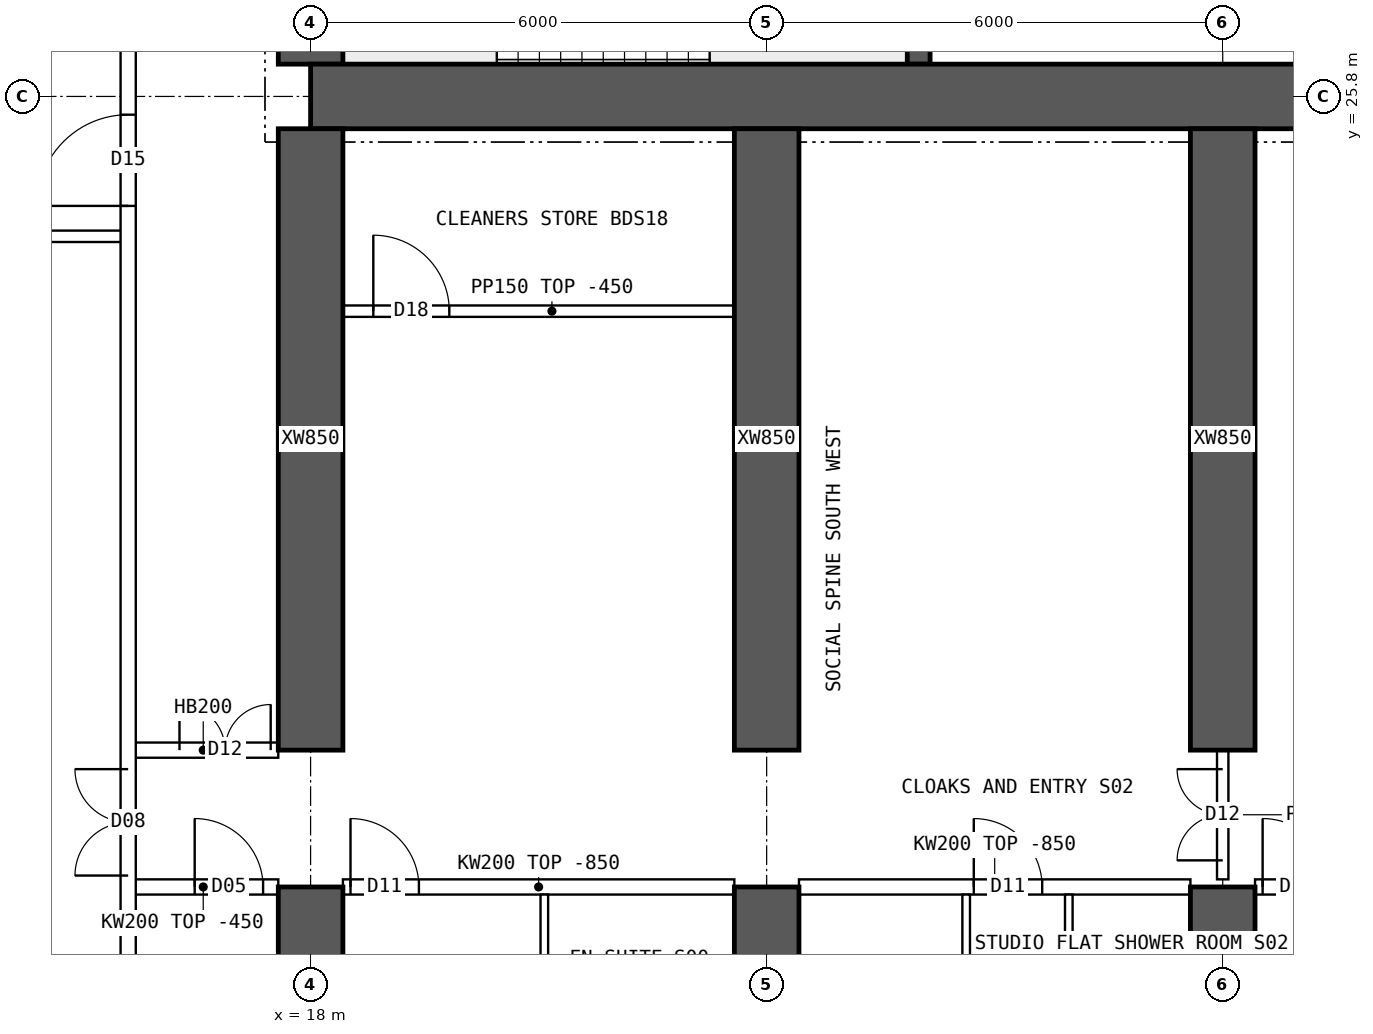
"""IFC4 building model, lengths in metres.
Left out: names, types, materials, properties, quantities, classifications, styles, units other than length and angle.
Written with IfcOpenShell. Run it as: python <this file> out.ifc"""

import sys

from ifc_helpers import new_model, si_unit, direction, frame, frame_2d, origin, place, context, subcontext, project, spatial, polyline, rectangle, outline, extrude, element, fill, save


model = new_model("IFC4")
c1 = context("Model", 3, precision=1e-05, world=origin(), true_north=direction((0.0, 1.0)))
c2 = subcontext(c1, "Body", "Model", "MODEL_VIEW")
j1 = project(units=[si_unit("LENGTHUNIT", "METRE"), si_unit("PLANEANGLEUNIT", "RADIAN")], contexts=[c1])
p1 = place(None, origin())
s1 = spatial("IfcSite", under=j1, at=p1, CompositionType="ELEMENT")
p2 = place(p1, origin())
s2 = spatial("IfcBuilding", under=s1, at=p2, CompositionType="ELEMENT")
p3 = place(p2, frame((0.0, 0.0, 174.85)))
s3 = spatial("IfcBuildingStorey", under=s2, at=p3, CompositionType="ELEMENT", Elevation=174.85)
p4 = place(p3, frame((18.0, 25.8, 0.0), z_axis=(0.0, 0.0, 1.0), x_axis=(1.0, 0.0, 0.0)))
e1 = element("IfcWall", 1, at=p4, inside=s3, PredefinedType="SHEAR", context=c2, shape_type="SweptSolid", body=[
    extrude(rectangle(XDim=48.0, YDim=0.85, at=frame_2d((24.0, 0.0))), origin(), (0.0, 0.0, 1.0), 3.75),
])
p5 = place(p3, frame((18.0, 26.225, 0.0), z_axis=(0.0, 0.0, 1.0), x_axis=(0.0, 1.0, 0.0)))
e2 = element("IfcWall", 2, at=p5, inside=s3, PredefinedType="SHEAR", context=c2, shape_type="SweptSolid", body=[
    extrude(rectangle(XDim=11.55, YDim=0.85, at=frame_2d((5.775, 0.0))), origin(), (0.0, 0.0, 1.0), 3.75),
])
p6 = place(p5, frame((5.075, 0.0, 0.0)))
e3 = element("IfcOpeningElement", 3, at=p6, cuts=e2, PredefinedType="OPENING", context=c2, shape_type="SweptSolid", body=[
    extrude(rectangle(XDim=1.2, YDim=2.1, at=frame_2d((0.6, 1.05))), frame((0.0, 0.435, 0.0), z_axis=(0.0, -1.0, 0.0), x_axis=(1.0, 0.0, 0.0)), (0.0, 0.0, 1.0), 0.87),
])
p7 = place(p3, frame((26.0, 26.225, 0.0), z_axis=(0.0, 0.0, 1.0), x_axis=(0.0, 1.0, 0.0)))
e4 = element("IfcWall", 4, at=p7, inside=s3, PredefinedType="SHEAR", context=c2, shape_type="SweptSolid", body=[
    extrude(rectangle(XDim=4.025, YDim=0.3, at=frame_2d((2.012, 0.0))), origin(), (0.0, 0.0, 1.0), 3.75),
])
p8 = place(p3, frame((18.0, 10.0, 0.0), z_axis=(0.0, 0.0, 1.0), x_axis=(0.0, 1.0, 0.0)))
e5 = element("IfcWall", 5, at=p8, inside=s3, PredefinedType="SHEAR", context=c2, shape_type="SweptSolid", body=[
    extrude(rectangle(XDim=5.4, YDim=0.85, at=frame_2d((2.7, 0.0))), origin(), (0.0, 0.0, 1.0), 3.75),
])
p9 = place(p3, frame((18.0, 17.2, 0.0), z_axis=(0.0, 0.0, 1.0), x_axis=(0.0, 1.0, 0.0)))
e6 = element("IfcWall", 6, at=p9, inside=s3, PredefinedType="SHEAR", context=c2, shape_type="SweptSolid", body=[
    extrude(rectangle(XDim=8.175, YDim=0.85, at=frame_2d((4.087, 0.0))), origin(), (0.0, 0.0, 1.0), 3.75),
])
p10 = place(p3, frame((24.0, 10.0, 0.0), z_axis=(0.0, 0.0, 1.0), x_axis=(0.0, 1.0, 0.0)))
e7 = element("IfcWall", 7, at=p10, inside=s3, PredefinedType="SHEAR", context=c2, shape_type="SweptSolid", body=[
    extrude(rectangle(XDim=5.4, YDim=0.85, at=frame_2d((2.7, 0.0))), origin(), (0.0, 0.0, 1.0), 3.75),
])
p11 = place(p3, frame((24.0, 17.2, 0.0), z_axis=(0.0, 0.0, 1.0), x_axis=(0.0, 1.0, 0.0)))
e8 = element("IfcWall", 8, at=p11, inside=s3, PredefinedType="SHEAR", context=c2, shape_type="SweptSolid", body=[
    extrude(rectangle(XDim=8.175, YDim=0.85, at=frame_2d((4.087, 0.0))), origin(), (0.0, 0.0, 1.0), 3.75),
])
p12 = place(p3, frame((30.0, 10.0, 0.0), z_axis=(0.0, 0.0, 1.0), x_axis=(0.0, 1.0, 0.0)))
e9 = element("IfcWall", 9, at=p12, inside=s3, PredefinedType="SHEAR", context=c2, shape_type="SweptSolid", body=[
    extrude(rectangle(XDim=5.4, YDim=0.85, at=frame_2d((2.7, 0.0))), origin(), (0.0, 0.0, 1.0), 3.75),
])
p13 = place(p3, frame((30.0, 17.2, 0.0), z_axis=(0.0, 0.0, 1.0), x_axis=(0.0, 1.0, 0.0)))
e10 = element("IfcWall", 10, at=p13, inside=s3, PredefinedType="SHEAR", context=c2, shape_type="SweptSolid", body=[
    extrude(rectangle(XDim=8.175, YDim=0.85, at=frame_2d((4.087, 0.0))), origin(), (0.0, 0.0, 1.0), 3.75),
])
p14 = place(p3, frame((15.6, 15.4, 0.0), z_axis=(0.0, 0.0, 1.0), x_axis=(1.0, 0.0, 0.0)))
e11 = element("IfcWall", 11, at=p14, inside=s3, PredefinedType="SOLIDWALL", context=c2, shape_type="SweptSolid", body=[
    extrude(rectangle(XDim=1.975, YDim=0.2, at=frame_2d((0.987, 0.0))), origin(), (0.0, 0.0, 1.0), 3.3),
])
p15 = place(p14, frame((0.875, 0.0, 0.0)))
e12 = element("IfcOpeningElement", 12, at=p15, cuts=e11, PredefinedType="OPENING", context=c2, shape_type="SweptSolid", body=[
    extrude(rectangle(XDim=0.9, YDim=2.1, at=frame_2d((0.45, 1.05))), frame((0.0, 0.11, 0.0), z_axis=(0.0, -1.0, 0.0), x_axis=(1.0, 0.0, 0.0)), (0.0, 0.0, 1.0), 0.22),
])
p16 = place(p3, frame((15.6, 17.2, 0.0), z_axis=(0.0, 0.0, 1.0), x_axis=(1.0, 0.0, 0.0)))
e13 = element("IfcWall", 13, at=p16, inside=s3, PredefinedType="SOLIDWALL", context=c2, shape_type="SweptSolid", body=[
    extrude(rectangle(XDim=1.975, YDim=0.2, at=frame_2d((0.987, 0.0))), origin(), (0.0, 0.0, 1.0), 3.3),
])
p17 = place(p16, frame((0.675, 0.0, 0.0)))
e14 = element("IfcOpeningElement", 14, at=p17, cuts=e13, PredefinedType="OPENING", context=c2, shape_type="SweptSolid", body=[
    extrude(rectangle(XDim=1.2, YDim=2.1, at=frame_2d((0.6, 1.05))), frame((0.0, 0.11, 0.0), z_axis=(0.0, -1.0, 0.0), x_axis=(1.0, 0.0, 0.0)), (0.0, 0.0, 1.0), 0.22),
])
p18 = place(p3, frame((18.425, 15.4, 0.0), z_axis=(0.0, 0.0, 1.0), x_axis=(1.0, 0.0, 0.0)))
e15 = element("IfcWall", 15, at=p18, inside=s3, PredefinedType="SOLIDWALL", context=c2, shape_type="SweptSolid", body=[
    extrude(outline(polyline([(0.0, 0.0), (5.15, 0.0), (5.15, 2.9), (0.0, 2.9), (0.0, 0.0)])), frame((0.0, 0.1, 0.0), z_axis=(0.0, -1.0, 0.0), x_axis=(1.0, 0.0, 0.0)), (0.0, 0.0, 1.0), 0.2),
])
p19 = place(p18, frame((0.1, 0.0, 0.0)))
e16 = element("IfcOpeningElement", 16, at=p19, cuts=e15, PredefinedType="OPENING", context=c2, shape_type="SweptSolid", body=[
    extrude(rectangle(XDim=0.9, YDim=2.1, at=frame_2d((0.45, 1.05))), frame((0.0, 0.11, 0.0), z_axis=(0.0, -1.0, 0.0), x_axis=(1.0, 0.0, 0.0)), (0.0, 0.0, 1.0), 0.22),
])
p20 = place(p3, frame((24.425, 15.4, 0.0), z_axis=(0.0, 0.0, 1.0), x_axis=(1.0, 0.0, 0.0)))
e17 = element("IfcWall", 17, at=p20, inside=s3, PredefinedType="SOLIDWALL", context=c2, shape_type="SweptSolid", body=[
    extrude(outline(polyline([(0.0, 0.0), (5.15, 0.0), (5.15, 2.9), (0.0, 2.9), (0.0, 0.0)])), frame((0.0, 0.1, 0.0), z_axis=(0.0, -1.0, 0.0), x_axis=(1.0, 0.0, 0.0)), (0.0, 0.0, 1.0), 0.2),
])
p21 = place(p20, frame((2.3, 0.0, 0.0)))
e18 = element("IfcOpeningElement", 18, at=p21, cuts=e17, PredefinedType="OPENING", context=c2, shape_type="SweptSolid", body=[
    extrude(rectangle(XDim=0.9, YDim=2.1, at=frame_2d((0.45, 1.05))), frame((0.0, 0.11, 0.0), z_axis=(0.0, -1.0, 0.0), x_axis=(1.0, 0.0, 0.0)), (0.0, 0.0, 1.0), 0.22),
])
p22 = place(p3, frame((30.425, 15.4, 0.0), z_axis=(0.0, 0.0, 1.0), x_axis=(1.0, 0.0, 0.0)))
e19 = element("IfcWall", 19, at=p22, inside=s3, PredefinedType="SOLIDWALL", context=c2, shape_type="SweptSolid", body=[
    extrude(outline(polyline([(0.0, 0.0), (5.15, 0.0), (5.15, 2.9), (0.0, 2.9), (0.0, 0.0)])), frame((0.0, 0.1, 0.0), z_axis=(0.0, -1.0, 0.0), x_axis=(1.0, 0.0, 0.0)), (0.0, 0.0, 1.0), 0.2),
])
p23 = place(p22, frame((0.1, 0.0, 0.0)))
e20 = element("IfcOpeningElement", 20, at=p23, cuts=e19, PredefinedType="OPENING", context=c2, shape_type="SweptSolid", body=[
    extrude(rectangle(XDim=0.9, YDim=2.1, at=frame_2d((0.45, 1.05))), frame((0.0, 0.11, 0.0), z_axis=(0.0, -1.0, 0.0), x_axis=(1.0, 0.0, 0.0)), (0.0, 0.0, 1.0), 0.22),
])
p24 = place(p3, frame((21.075, 12.55, 0.0), z_axis=(0.0, 0.0, 1.0), x_axis=(0.0, 1.0, 0.0)))
e21 = element("IfcWall", 21, at=p24, inside=s3, PredefinedType="PARTITIONING", context=c2, shape_type="SweptSolid", body=[
    extrude(outline(polyline([(0.0, 0.0), (2.75, 0.0), (2.75, 2.9), (2.702, 2.9), (2.7, 3.3), (0.0, 3.3), (0.0, 0.0)])), frame((0.0, 0.05, 0.0), z_axis=(0.0, -1.0, 0.0), x_axis=(1.0, 0.0, 0.0)), (0.0, 0.0, 1.0), 0.1),
])
p25 = place(p3, frame((26.625, 12.95, 0.0), z_axis=(0.0, 0.0, 1.0), x_axis=(0.0, 1.0, 0.0)))
e22 = element("IfcWall", 22, at=p25, inside=s3, PredefinedType="PARTITIONING", context=c2, shape_type="SweptSolid", body=[
    extrude(outline(polyline([(0.0, 0.0), (2.35, 0.0), (2.35, 2.9), (2.302, 2.9), (2.3, 3.3), (0.0, 3.3), (0.0, 0.0)])), frame((0.0, 0.05, 0.0), z_axis=(0.0, -1.0, 0.0), x_axis=(1.0, 0.0, 0.0)), (0.0, 0.0, 1.0), 0.1),
])
p26 = place(p3, frame((27.975, 12.95, 0.0), z_axis=(0.0, 0.0, 1.0), x_axis=(0.0, 1.0, 0.0)))
e23 = element("IfcWall", 23, at=p26, inside=s3, PredefinedType="PARTITIONING", context=c2, shape_type="SweptSolid", body=[
    extrude(outline(polyline([(0.0, 0.0), (2.35, 0.0), (2.35, 2.9), (2.302, 2.9), (2.3, 3.3), (0.0, 3.3), (0.0, 0.0)])), frame((0.0, 0.05, 0.0), z_axis=(0.0, -1.0, 0.0), x_axis=(1.0, 0.0, 0.0)), (0.0, 0.0, 1.0), 0.1),
])
p27 = place(p26, frame((0.8, 0.0, 0.0)))
e24 = element("IfcOpeningElement", 24, at=p27, cuts=e23, PredefinedType="OPENING", context=c2, shape_type="SweptSolid", body=[
    extrude(rectangle(XDim=0.8, YDim=2.1, at=frame_2d((0.4, 1.05))), frame((0.0, 0.06, 0.0), z_axis=(0.0, -1.0, 0.0), x_axis=(1.0, 0.0, 0.0)), (0.0, 0.0, 1.0), 0.12),
])
p28 = place(p3, frame((18.425, 22.975, 0.0), z_axis=(0.0, 0.0, 1.0), x_axis=(1.0, 0.0, 0.0)))
e25 = element("IfcWall", 25, at=p28, inside=s3, PredefinedType="PARTITIONING", context=c2, shape_type="SweptSolid", body=[
    extrude(rectangle(XDim=5.5, YDim=0.15, at=frame_2d((2.75, 0.0))), origin(), (0.0, 0.0, 1.0), 3.3),
])
p29 = place(p28, frame((0.4, 0.0, 0.0)))
e26 = element("IfcOpeningElement", 26, at=p29, cuts=e25, PredefinedType="OPENING", context=c2, shape_type="SweptSolid", body=[
    extrude(rectangle(XDim=1.0, YDim=2.1, at=frame_2d((0.5, 1.05))), frame((0.0, 0.085, 0.0), z_axis=(0.0, -1.0, 0.0), x_axis=(1.0, 0.0, 0.0)), (0.0, 0.0, 1.0), 0.17),
])
p30 = place(p3, frame((30.0, 15.5, 0.0), z_axis=(0.0, 0.0, 1.0), x_axis=(0.0, 1.0, 0.0)))
e27 = element("IfcWall", 27, at=p30, inside=s3, PredefinedType="PARTITIONING", context=c2, shape_type="SweptSolid", body=[
    extrude(outline(polyline([(0.0, 0.0), (1.7, 0.0), (1.7, 2.9), (0.0, 2.9), (0.0, 0.0)])), frame((0.0, 0.075, 0.0), z_axis=(0.0, -1.0, 0.0), x_axis=(1.0, 0.0, 0.0)), (0.0, 0.0, 1.0), 0.15),
])
p31 = place(p30, frame((0.25, 0.0, 0.0)))
e28 = element("IfcOpeningElement", 28, at=p31, cuts=e27, PredefinedType="OPENING", context=c2, shape_type="SweptSolid", body=[
    extrude(rectangle(XDim=1.2, YDim=2.1, at=frame_2d((0.6, 1.05))), frame((0.0, 0.085, 0.0), z_axis=(0.0, -1.0, 0.0), x_axis=(1.0, 0.0, 0.0)), (0.0, 0.0, 1.0), 0.17),
])
p32 = place(p3, frame((15.6, 10.446, 0.0), z_axis=(0.0, 0.0, 1.0), x_axis=(0.0, 1.0, 0.0)))
e29 = element("IfcWall", 29, at=p32, inside=s3, PredefinedType="SOLIDWALL", context=c2, shape_type="SweptSolid", body=[
    extrude(rectangle(XDim=43.107, YDim=0.2, at=frame_2d((21.554, 0.0))), origin(), (0.0, 0.0, 1.0), 3.3),
])
p33 = place(p32, frame((13.914, 0.0, 0.0)))
e30 = element("IfcOpeningElement", 30, at=p33, cuts=e29, PredefinedType="OPENING", context=c2, shape_type="SweptSolid", body=[
    extrude(rectangle(XDim=1.2, YDim=2.1, at=frame_2d((0.6, 1.05))), frame((0.0, 0.11, 0.0), z_axis=(0.0, -1.0, 0.0), x_axis=(1.0, 0.0, 0.0)), (0.0, 0.0, 1.0), 0.22),
])
p34 = place(p32, frame((27.994, 0.0, 0.0)))
e31 = element("IfcOpeningElement", 31, at=p34, cuts=e29, PredefinedType="OPENING", context=c2, shape_type="SweptSolid", body=[
    extrude(rectangle(XDim=1.2, YDim=2.1, at=frame_2d((0.6, 1.05))), frame((0.0, 0.11, 0.0), z_axis=(0.0, -1.0, 0.0), x_axis=(1.0, 0.0, 0.0)), (0.0, 0.0, 1.0), 0.22),
])
p35 = place(p32, frame((5.104, 0.0, 0.0)))
e32 = element("IfcOpeningElement", 32, at=p35, cuts=e29, PredefinedType="OPENING", context=c2, shape_type="SweptSolid", body=[
    extrude(rectangle(XDim=1.4, YDim=2.1, at=frame_2d((0.7, 1.05))), frame((0.0, 0.11, 0.0), z_axis=(0.0, -1.0, 0.0), x_axis=(1.0, 0.0, 0.0)), (0.0, 0.0, 1.0), 0.22),
])
p36 = place(p32, frame((36.504, 0.0, 0.0)))
e33 = element("IfcOpeningElement", 33, at=p36, cuts=e29, PredefinedType="OPENING", context=c2, shape_type="SweptSolid", body=[
    extrude(rectangle(XDim=1.4, YDim=2.1, at=frame_2d((0.7, 1.05))), frame((0.0, 0.11, 0.0), z_axis=(0.0, -1.0, 0.0), x_axis=(1.0, 0.0, 0.0)), (0.0, 0.0, 1.0), 0.22),
])
p37 = place(p3, frame((8.705, 23.96, 0.0), z_axis=(0.0, 0.0, 1.0), x_axis=(1.0, 0.0, 0.0)))
e34 = element("IfcWall", 34, at=p37, inside=s3, PredefinedType="PARTITIONING", context=c2, shape_type="SweptSolid", body=[
    extrude(rectangle(XDim=6.82, YDim=0.15, at=frame_2d((3.41, 0.0))), origin(), (0.0, 0.0, 1.0), 3.3),
])
p38 = place(p17, origin())
e35 = element("IfcDoor", 35, at=p38, inside=s3, OperationType="DOUBLE_DOOR_SINGLE_SWING", PredefinedType="DOOR", context=c2, shape_type="SweptSolid", body=[
    extrude(rectangle(XDim=1.2, YDim=2.1, at=frame_2d((0.6, 1.05))), frame((0.0, 0.025, 0.0), z_axis=(0.0, -1.0, 0.0), x_axis=(1.0, 0.0, 0.0)), (0.0, 0.0, 1.0), 0.05),
])
fill(e14, e35)
p39 = place(p19, origin())
e36 = element("IfcDoor", 36, at=p39, inside=s3, OperationType="SINGLE_SWING_LEFT", PredefinedType="DOOR", context=c2, shape_type="SweptSolid", body=[
    extrude(rectangle(XDim=0.9, YDim=2.1, at=frame_2d((0.45, 1.05))), frame((0.0, 0.025, 0.0), z_axis=(0.0, -1.0, 0.0), x_axis=(1.0, 0.0, 0.0)), (0.0, 0.0, 1.0), 0.05),
])
fill(e16, e36)
p40 = place(p27, origin())
e37 = element("IfcDoor", 37, at=p40, inside=s3, OperationType="SINGLE_SWING_RIGHT", PredefinedType="DOOR", context=c2, shape_type="SweptSolid", body=[
    extrude(rectangle(XDim=0.8, YDim=2.1, at=frame_2d((0.4, 1.05))), frame((0.0, 0.025, 0.0), z_axis=(0.0, -1.0, 0.0), x_axis=(1.0, 0.0, 0.0)), (0.0, 0.0, 1.0), 0.05),
])
fill(e24, e37)
p41 = place(p21, origin())
e38 = element("IfcDoor", 38, at=p41, inside=s3, OperationType="SINGLE_SWING_LEFT", PredefinedType="DOOR", context=c2, shape_type="SweptSolid", body=[
    extrude(rectangle(XDim=0.9, YDim=2.1, at=frame_2d((0.45, 1.05))), frame((0.0, 0.025, 0.0), z_axis=(0.0, -1.0, 0.0), x_axis=(1.0, 0.0, 0.0)), (0.0, 0.0, 1.0), 0.05),
])
fill(e18, e38)
p42 = place(p23, origin())
e39 = element("IfcDoor", 39, at=p42, inside=s3, OperationType="SINGLE_SWING_LEFT", PredefinedType="DOOR", context=c2, shape_type="SweptSolid", body=[
    extrude(rectangle(XDim=0.9, YDim=2.1, at=frame_2d((0.45, 1.05))), frame((0.0, 0.025, 0.0), z_axis=(0.0, -1.0, 0.0), x_axis=(1.0, 0.0, 0.0)), (0.0, 0.0, 1.0), 0.05),
])
fill(e20, e39)
p43 = place(p29, origin())
e40 = element("IfcDoor", 40, at=p43, inside=s3, OperationType="SINGLE_SWING_LEFT", PredefinedType="DOOR", context=c2, shape_type="SweptSolid", body=[
    extrude(rectangle(XDim=1.0, YDim=2.1, at=frame_2d((0.5, 1.05))), frame((0.0, 0.025, 0.0), z_axis=(0.0, -1.0, 0.0), x_axis=(1.0, 0.0, 0.0)), (0.0, 0.0, 1.0), 0.05),
])
fill(e26, e40)
p44 = place(p31, origin())
e41 = element("IfcDoor", 41, at=p44, inside=s3, OperationType="DOUBLE_DOOR_SINGLE_SWING", PredefinedType="DOOR", context=c2, shape_type="SweptSolid", body=[
    extrude(rectangle(XDim=1.2, YDim=2.1, at=frame_2d((0.6, 1.05))), frame((0.0, 0.025, 0.0), z_axis=(0.0, -1.0, 0.0), x_axis=(1.0, 0.0, 0.0)), (0.0, 0.0, 1.0), 0.05),
])
fill(e28, e41)
p45 = place(p33, origin())
e42 = element("IfcDoor", 42, at=p45, inside=s3, OperationType="SINGLE_SWING_LEFT", PredefinedType="DOOR", context=c2, shape_type="SweptSolid", body=[
    extrude(rectangle(XDim=1.2, YDim=2.1, at=frame_2d((0.6, 1.05))), frame((0.0, 0.025, 0.0), z_axis=(0.0, -1.0, 0.0), x_axis=(1.0, 0.0, 0.0)), (0.0, 0.0, 1.0), 0.05),
])
fill(e30, e42)
p46 = place(p35, origin())
e43 = element("IfcDoor", 43, at=p46, inside=s3, OperationType="DOUBLE_DOOR_SINGLE_SWING", PredefinedType="DOOR", context=c2, shape_type="SweptSolid", body=[
    extrude(rectangle(XDim=1.4, YDim=2.1, at=frame_2d((0.7, 1.05))), frame((0.0, 0.025, 0.0), z_axis=(0.0, -1.0, 0.0), x_axis=(1.0, 0.0, 0.0)), (0.0, 0.0, 1.0), 0.05),
])
fill(e32, e43)
p47 = place(p15, origin())
e44 = element("IfcDoor", 44, at=p47, inside=s3, OperationType="SINGLE_SWING_LEFT", PredefinedType="DOOR", context=c2, shape_type="SweptSolid", body=[
    extrude(rectangle(XDim=0.9, YDim=2.1, at=frame_2d((0.45, 1.05))), frame((0.0, 0.025, 0.0), z_axis=(0.0, -1.0, 0.0), x_axis=(1.0, 0.0, 0.0)), (0.0, 0.0, 1.0), 0.05),
])
fill(e12, e44)
save(model, sys.argv[1])
